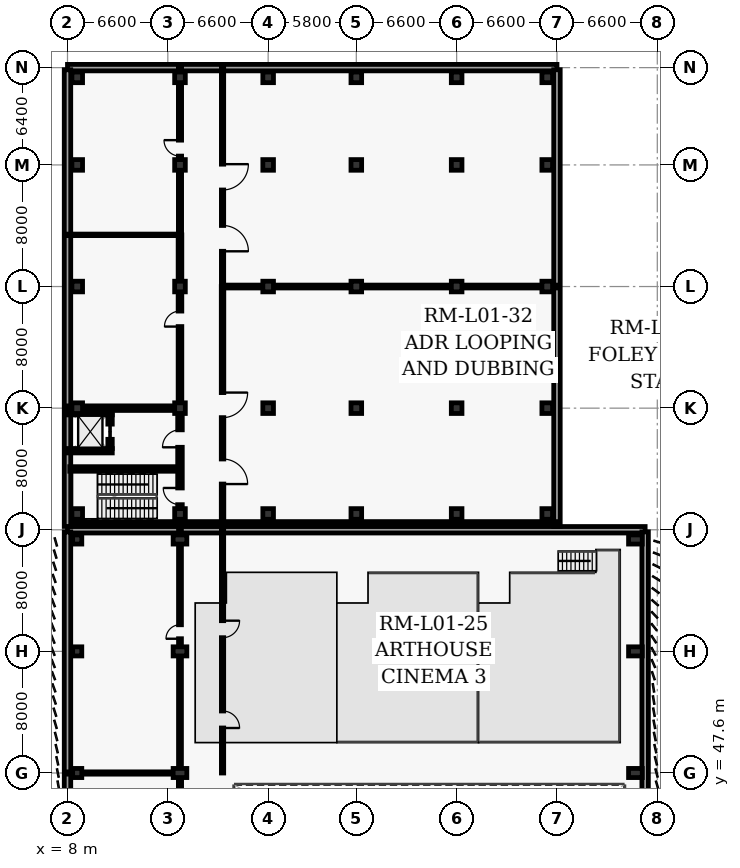
"""IFC4 building model, lengths in metres.
Left out: names, types, materials, properties, quantities, classifications, styles, units other than length and angle.
Written with IfcOpenShell. Run it as: python <this file> out.ifc"""

import sys

from ifc_helpers import new_model, si_unit, direction, frame, frame_2d, origin, origin_2d, place, context, subcontext, project, spatial, rectangle, extrude, element, fill, save


model = new_model("IFC4")
c1 = context("Model", 3, precision=1e-05, world=origin(), true_north=direction((0.0, 1.0)))
c2 = subcontext(c1, "Body", "Model", "MODEL_VIEW")
j1 = project(units=[si_unit("LENGTHUNIT", "METRE"), si_unit("PLANEANGLEUNIT", "RADIAN")], contexts=[c1])
p1 = place(None, origin())
s1 = spatial("IfcSite", under=j1, at=p1, CompositionType="ELEMENT")
p2 = place(p1, origin())
s2 = spatial("IfcBuilding", under=s1, at=p2, CompositionType="ELEMENT")
p3 = place(p2, frame((0.0, 0.0, 5.4)))
s3 = spatial("IfcBuildingStorey", under=s2, at=p3, CompositionType="ELEMENT", Elevation=5.4)
for number, where, z_axis, x_axis in (
    (1, (8.64, 47.6, 0.0), (0.0, 0.0, 1.0), (1.0, 0.0, 0.0)),
    (2, (8.64, 55.6, 0.0), (0.0, 0.0, 1.0), (1.0, 0.0, 0.0)),
    (3, (8.64, 62.96, 0.0), (0.0, 0.0, 1.0), (1.0, 0.0, 0.0)),
):
    element("IfcColumn", number, at=place(p3, frame(where, z_axis=z_axis, x_axis=x_axis)), inside=s3, PredefinedType="COLUMN", context=c2, shape_type="SweptSolid", body=[
        extrude(rectangle(XDim=0.6, YDim=0.6, at=origin_2d()), origin(), (0.0, 0.0, 1.0), 4.8),
    ])
for number, where, z_axis, x_axis in (
    (4, (15.4, 47.6, 0.0), (0.0, 0.0, 1.0), (1.0, 0.0, 0.0)),
    (5, (15.4, 55.6, 0.0), (0.0, 0.0, 1.0), (1.0, 0.0, 0.0)),
    (6, (15.4, 62.96, 0.0), (0.0, 0.0, 1.0), (1.0, 0.0, 0.0)),
    (7, (45.36, 47.6, 0.0), (0.0, 0.0, 1.0), (1.0, 0.0, 0.0)),
    (8, (45.36, 55.6, 0.0), (0.0, 0.0, 1.0), (1.0, 0.0, 0.0)),
    (9, (45.36, 62.96, 0.0), (0.0, 0.0, 1.0), (1.0, 0.0, 0.0)),
):
    element("IfcColumn", number, at=place(p3, frame(where, z_axis=z_axis, x_axis=x_axis)), inside=s3, PredefinedType="COLUMN", context=c2, shape_type="SweptSolid", body=[
        extrude(rectangle(XDim=0.6, YDim=0.9, at=origin_2d()), origin(), (0.0, 0.0, 1.0), 4.8),
    ])
for number, where, z_axis, x_axis in (
    (10, (8.64, 64.64, 0.0), (0.0, 0.0, 1.0), (1.0, 0.0, 0.0)),
    (11, (8.64, 71.6, 0.0), (0.0, 0.0, 1.0), (1.0, 0.0, 0.0)),
    (12, (8.64, 79.6, 0.0), (0.0, 0.0, 1.0), (1.0, 0.0, 0.0)),
    (13, (8.64, 87.6, 0.0), (0.0, 0.0, 1.0), (1.0, 0.0, 0.0)),
    (14, (8.64, 93.36, 0.0), (0.0, 0.0, 1.0), (1.0, 0.0, 0.0)),
    (15, (15.4, 64.64, 0.0), (0.0, 0.0, 1.0), (1.0, 0.0, 0.0)),
    (16, (15.4, 71.6, 0.0), (0.0, 0.0, 1.0), (1.0, 0.0, 0.0)),
    (17, (15.4, 79.6, 0.0), (0.0, 0.0, 1.0), (1.0, 0.0, 0.0)),
    (18, (15.4, 87.6, 0.0), (0.0, 0.0, 1.0), (1.0, 0.0, 0.0)),
    (19, (15.4, 93.36, 0.0), (0.0, 0.0, 1.0), (1.0, 0.0, 0.0)),
    (20, (21.2, 64.64, 0.0), (0.0, 0.0, 1.0), (1.0, 0.0, 0.0)),
    (21, (21.2, 71.6, 0.0), (0.0, 0.0, 1.0), (1.0, 0.0, 0.0)),
    (22, (21.2, 79.6, 0.0), (0.0, 0.0, 1.0), (1.0, 0.0, 0.0)),
    (23, (21.2, 87.6, 0.0), (0.0, 0.0, 1.0), (1.0, 0.0, 0.0)),
    (24, (21.2, 93.36, 0.0), (0.0, 0.0, 1.0), (1.0, 0.0, 0.0)),
    (25, (27.0, 64.64, 0.0), (0.0, 0.0, 1.0), (1.0, 0.0, 0.0)),
    (26, (27.0, 71.6, 0.0), (0.0, 0.0, 1.0), (1.0, 0.0, 0.0)),
    (27, (27.0, 79.6, 0.0), (0.0, 0.0, 1.0), (1.0, 0.0, 0.0)),
    (28, (27.0, 87.6, 0.0), (0.0, 0.0, 1.0), (1.0, 0.0, 0.0)),
    (29, (27.0, 93.36, 0.0), (0.0, 0.0, 1.0), (1.0, 0.0, 0.0)),
    (30, (33.6, 64.64, 0.0), (0.0, 0.0, 1.0), (1.0, 0.0, 0.0)),
    (31, (33.6, 71.6, 0.0), (0.0, 0.0, 1.0), (1.0, 0.0, 0.0)),
    (32, (33.6, 79.6, 0.0), (0.0, 0.0, 1.0), (1.0, 0.0, 0.0)),
    (33, (33.6, 87.6, 0.0), (0.0, 0.0, 1.0), (1.0, 0.0, 0.0)),
    (34, (33.6, 93.36, 0.0), (0.0, 0.0, 1.0), (1.0, 0.0, 0.0)),
    (35, (39.56, 64.64, 0.0), (0.0, 0.0, 1.0), (1.0, 0.0, 0.0)),
    (36, (39.56, 71.6, 0.0), (0.0, 0.0, 1.0), (1.0, 0.0, 0.0)),
    (37, (39.56, 79.6, 0.0), (0.0, 0.0, 1.0), (1.0, 0.0, 0.0)),
    (38, (39.56, 87.6, 0.0), (0.0, 0.0, 1.0), (1.0, 0.0, 0.0)),
    (39, (39.56, 93.36, 0.0), (0.0, 0.0, 1.0), (1.0, 0.0, 0.0)),
):
    element("IfcColumn", number, at=place(p3, frame(where, z_axis=z_axis, x_axis=x_axis)), inside=s3, PredefinedType="COLUMN", context=c2, shape_type="SweptSolid", body=[
        extrude(rectangle(XDim=0.7, YDim=0.7, at=origin_2d()), origin(), (0.0, 0.0, 1.0), 4.8),
    ])
p4 = place(p3, frame((8.0, 63.6, 0.0), z_axis=(0.0, 0.0, 1.0), x_axis=(1.0, 0.0, 0.0)))
e40 = element("IfcWall", 40, at=p4, inside=s3, PredefinedType="SOLIDWALL", context=c2, shape_type="SweptSolid", body=[
    extrude(rectangle(XDim=38.0, YDim=0.425, at=frame_2d((19.0, 0.0))), origin(), (0.0, 0.0, 1.0), 4.52),
])
for number, where, z_axis, x_axis in (
    (41, (46.0, 63.46, 0.0), (0.0, 0.0, 1.0), (0.0, -1.0, 0.0)),
    (42, (8.0, 7.74, 0.0), (0.0, 0.0, 1.0), (0.0, 1.0, 0.0)),
):
    element("IfcWall", number, at=place(p3, frame(where, z_axis=z_axis, x_axis=x_axis)), inside=s3, PredefinedType="SOLIDWALL", context=c2, shape_type="SweptSolid", body=[
        extrude(rectangle(XDim=55.72, YDim=0.425, at=frame_2d((27.86, 0.0))), origin(), (0.0, 0.0, 1.0), 4.52),
    ])
p5 = place(p3, frame((8.0, 94.0, 0.0), z_axis=(0.0, 0.0, 1.0), x_axis=(1.0, 0.0, 0.0)))
e43 = element("IfcWall", 43, at=p5, inside=s3, PredefinedType="SOLIDWALL", context=c2, shape_type="SweptSolid", body=[
    extrude(rectangle(XDim=32.2, YDim=0.425, at=frame_2d((16.1, 0.0))), origin(), (0.0, 0.0, 1.0), 3.075),
])
p6 = place(p3, frame((40.2, 93.86, 0.0), z_axis=(0.0, 0.0, 1.0), x_axis=(0.0, -1.0, 0.0)))
e44 = element("IfcWall", 44, at=p6, inside=s3, PredefinedType="SOLIDWALL", context=c2, shape_type="SweptSolid", body=[
    extrude(rectangle(XDim=30.042, YDim=0.425, at=frame_2d((15.021, 0.0))), origin(), (0.0, 0.0, 1.0), 4.475),
])
p7 = place(p3, frame((40.2, 64.0, 0.0), z_axis=(0.0, 0.0, 1.0), x_axis=(-1.0, 0.0, 0.0)))
e45 = element("IfcWall", 45, at=p7, inside=s3, PredefinedType="SOLIDWALL", context=c2, shape_type="SweptSolid", body=[
    extrude(rectangle(XDim=32.2, YDim=0.275, at=frame_2d((16.1, 0.0))), origin(), (0.0, 0.0, 1.0), 3.075),
])
p8 = place(p3, frame((8.0, 63.818, 0.0), z_axis=(0.0, 0.0, 1.0), x_axis=(0.0, 1.0, 0.0)))
e46 = element("IfcWall", 46, at=p8, inside=s3, PredefinedType="SOLIDWALL", context=c2, shape_type="SweptSolid", body=[
    extrude(rectangle(XDim=30.042, YDim=0.425, at=frame_2d((15.021, 0.0))), origin(), (0.0, 0.0, 1.0), 4.475),
])
p9 = place(p3, frame((7.85, 71.6, 0.0), z_axis=(0.0, 0.0, 1.0), x_axis=(1.0, 0.0, 0.0)))
e47 = element("IfcWall", 47, at=p9, inside=s3, PredefinedType="SHEAR", context=c2, shape_type="SweptSolid", body=[
    extrude(rectangle(XDim=7.198, YDim=0.3, at=frame_2d((3.599, 0.0))), origin(), (0.0, 0.0, 1.0), 4.475),
])
p10 = place(p3, frame((15.4, 64.15, 0.0), z_axis=(0.0, 0.0, 1.0), x_axis=(0.0, 1.0, 0.0)))
e48 = element("IfcWall", 48, at=p10, inside=s3, PredefinedType="SHEAR", context=c2, shape_type="SweptSolid", body=[
    extrude(rectangle(XDim=7.098, YDim=0.3, at=frame_2d((3.549, 0.0))), origin(), (0.0, 0.0, 1.0), 4.475),
])
p11 = place(p10, frame((1.1, 0.0, 0.0)))
e49 = element("IfcOpeningElement", 49, at=p11, cuts=e48, PredefinedType="OPENING", context=c2, shape_type="SweptSolid", body=[
    extrude(rectangle(XDim=1.1, YDim=2.15, at=frame_2d((0.55, 1.075))), frame((0.0, 0.16, 0.0), z_axis=(0.0, -1.0, 0.0), x_axis=(1.0, 0.0, 0.0)), (0.0, 0.0, 1.0), 0.32),
])
p12 = place(p10, frame((4.875, 0.0, 0.0)))
e50 = element("IfcOpeningElement", 50, at=p12, cuts=e48, PredefinedType="OPENING", context=c2, shape_type="SweptSolid", body=[
    extrude(rectangle(XDim=1.15, YDim=2.2, at=frame_2d((0.575, 1.1))), frame((0.0, 0.16, 0.0), z_axis=(0.0, -1.0, 0.0), x_axis=(1.0, 0.0, 0.0)), (0.0, 0.0, 1.0), 0.32),
])
p13 = place(p3, frame((8.15, 67.6, 0.0), z_axis=(0.0, 0.0, 1.0), x_axis=(1.0, 0.0, 0.0)))
e51 = element("IfcWall", 51, at=p13, inside=s3, PredefinedType="SHEAR", context=c2, shape_type="SweptSolid", body=[
    extrude(rectangle(XDim=7.1, YDim=0.3, at=frame_2d((3.55, 0.0))), origin(), (0.0, 0.0, 1.0), 4.475),
])
for number, where, z_axis, x_axis in (
    (52, (8.055, 68.8, 0.0), (0.0, 0.0, 1.0), (1.0, 0.0, 0.0)),
    (53, (8.055, 71.3, 0.0), (0.0, 0.0, 1.0), (1.0, 0.0, 0.0)),
):
    element("IfcWall", number, at=place(p3, frame(where, z_axis=z_axis, x_axis=x_axis)), inside=s3, PredefinedType="SHEAR", context=c2, shape_type="SweptSolid", body=[
        extrude(rectangle(XDim=2.89, YDim=0.29, at=frame_2d((1.445, 0.0))), origin(), (0.0, 0.0, 1.0), 4.475),
    ])
p14 = place(p3, frame((10.8, 68.945, 0.0), z_axis=(0.0, 0.0, 1.0), x_axis=(0.0, 1.0, 0.0)))
e54 = element("IfcWall", 54, at=p14, inside=s3, PredefinedType="SHEAR", context=c2, shape_type="SweptSolid", body=[
    extrude(rectangle(XDim=2.21, YDim=0.29, at=frame_2d((1.105, 0.0))), origin(), (0.0, 0.0, 1.0), 4.475),
])
p15 = place(p14, frame((0.605, 0.0, 0.0)))
e55 = element("IfcOpeningElement", 55, at=p15, cuts=e54, PredefinedType="OPENING", context=c2, shape_type="SweptSolid", body=[
    extrude(rectangle(XDim=1.0, YDim=2.15, at=frame_2d((0.5, 1.075))), frame((0.0, 0.155, 0.0), z_axis=(0.0, -1.0, 0.0), x_axis=(1.0, 0.0, 0.0)), (0.0, 0.0, 1.0), 0.31),
])
p16 = place(p3, frame((15.4, 26.4, 0.0), z_axis=(0.0, 0.0, 1.0), x_axis=(0.0, 1.0, 0.0)))
e56 = element("IfcWall", 56, at=p16, inside=s3, PredefinedType="PARTITIONING", context=c2, shape_type="SweptSolid", body=[
    extrude(rectangle(XDim=20.748, YDim=0.21, at=frame_2d((10.374, 0.0))), origin(), (0.0, 0.0, 1.0), 3.67),
])
p17 = place(p16, frame((9.834, 0.0, 0.0)))
e57 = element("IfcOpeningElement", 57, at=p17, cuts=e56, PredefinedType="OPENING", context=c2, shape_type="SweptSolid", body=[
    extrude(rectangle(XDim=1.08, YDim=2.15, at=frame_2d((0.54, 1.075))), frame((0.0, 0.115, 0.0), z_axis=(0.0, -1.0, 0.0), x_axis=(1.0, 0.0, 0.0)), (0.0, 0.0, 1.0), 0.23),
])
p18 = place(p3, frame((15.4, 48.052, 0.0), z_axis=(0.0, 0.0, 1.0), x_axis=(0.0, 1.0, 0.0)))
e58 = element("IfcWall", 58, at=p18, inside=s3, PredefinedType="PARTITIONING", context=c2, shape_type="SweptSolid", body=[
    extrude(rectangle(XDim=15.548, YDim=0.19, at=frame_2d((7.774, 0.0))), origin(), (0.0, 0.0, 1.0), 3.67),
])
p19 = place(p18, frame((8.38, 0.0, 0.0)))
e59 = element("IfcOpeningElement", 59, at=p19, cuts=e58, PredefinedType="OPENING", context=c2, shape_type="SweptSolid", body=[
    extrude(rectangle(XDim=0.92, YDim=2.1, at=frame_2d((0.46, 1.05))), frame((0.0, 0.105, 0.0), z_axis=(0.0, -1.0, 0.0), x_axis=(1.0, 0.0, 0.0)), (0.0, 0.0, 1.0), 0.21),
])
p20 = place(p3, frame((18.2, 63.6, 0.0), z_axis=(0.0, 0.0, 1.0), x_axis=(0.0, -1.0, 0.0)))
e60 = element("IfcWall", 60, at=p20, inside=s3, PredefinedType="PARTITIONING", context=c2, shape_type="SweptSolid", body=[
    extrude(rectangle(XDim=16.0, YDim=0.15, at=frame_2d((8.0, 0.0))), origin(), (0.0, 0.0, 1.0), 4.52),
])
p21 = place(p20, frame((5.98, 0.0, 0.0)))
e61 = element("IfcOpeningElement", 61, at=p21, cuts=e60, PredefinedType="OPENING", context=c2, shape_type="SweptSolid", body=[
    extrude(rectangle(XDim=1.12, YDim=2.15, at=frame_2d((0.56, 1.075))), frame((0.0, 0.085, 0.0), z_axis=(0.0, -1.0, 0.0), x_axis=(1.0, 0.0, 0.0)), (0.0, 0.0, 1.0), 0.17),
])
p22 = place(p20, frame((11.92, 0.0, 0.0)))
e62 = element("IfcOpeningElement", 62, at=p22, cuts=e60, PredefinedType="OPENING", context=c2, shape_type="SweptSolid", body=[
    extrude(rectangle(XDim=1.12, YDim=2.15, at=frame_2d((0.56, 1.075))), frame((0.0, 0.085, 0.0), z_axis=(0.0, -1.0, 0.0), x_axis=(1.0, 0.0, 0.0)), (0.0, 0.0, 1.0), 0.17),
])
p23 = place(p3, frame((8.0, 47.6, 0.0), z_axis=(0.0, 0.0, 1.0), x_axis=(1.0, 0.0, 0.0)))
e63 = element("IfcWall", 63, at=p23, inside=s3, PredefinedType="PARTITIONING", context=c2, shape_type="SweptSolid", body=[
    extrude(rectangle(XDim=7.098, YDim=0.15, at=frame_2d((3.549, 0.0))), origin(), (0.0, 0.0, 1.0), 3.87),
])
p24 = place(p3, frame((18.2, 79.6, 0.0), z_axis=(0.0, 0.0, 1.0), x_axis=(0.0, -1.0, 0.0)))
e64 = element("IfcWall", 64, at=p24, inside=s3, PredefinedType="PARTITIONING", context=c2, shape_type="SweptSolid", body=[
    extrude(rectangle(XDim=15.6, YDim=0.165, at=frame_2d((7.8, 0.0))), origin(), (0.0, 0.0, 1.0), 4.475),
])
p25 = place(p24, frame((6.975, 0.0, 0.0)))
e65 = element("IfcOpeningElement", 65, at=p25, cuts=e64, PredefinedType="OPENING", context=c2, shape_type="SweptSolid", body=[
    extrude(rectangle(XDim=1.65, YDim=2.3, at=frame_2d((0.825, 1.15))), frame((0.0, 0.093, 0.0), z_axis=(0.0, -1.0, 0.0), x_axis=(1.0, 0.0, 0.0)), (0.0, 0.0, 1.0), 0.185),
])
p26 = place(p24, frame((11.343, 0.0, 0.0)))
e66 = element("IfcOpeningElement", 66, at=p26, cuts=e64, PredefinedType="OPENING", context=c2, shape_type="SweptSolid", body=[
    extrude(rectangle(XDim=1.65, YDim=2.3, at=frame_2d((0.825, 1.15))), frame((0.0, 0.093, 0.0), z_axis=(0.0, -1.0, 0.0), x_axis=(1.0, 0.0, 0.0)), (0.0, 0.0, 1.0), 0.185),
])
p27 = place(p3, frame((18.2, 94.0, 0.0), z_axis=(0.0, 0.0, 1.0), x_axis=(0.0, -1.0, 0.0)))
e67 = element("IfcWall", 67, at=p27, inside=s3, PredefinedType="PARTITIONING", context=c2, shape_type="SweptSolid", body=[
    extrude(rectangle(XDim=14.4, YDim=0.15, at=frame_2d((7.2, 0.0))), origin(), (0.0, 0.0, 1.0), 4.475),
])
p28 = place(p27, frame((6.35, 0.0, 0.0)))
e68 = element("IfcOpeningElement", 68, at=p28, cuts=e67, PredefinedType="OPENING", context=c2, shape_type="SweptSolid", body=[
    extrude(rectangle(XDim=1.7, YDim=2.3, at=frame_2d((0.85, 1.15))), frame((0.0, 0.085, 0.0), z_axis=(0.0, -1.0, 0.0), x_axis=(1.0, 0.0, 0.0)), (0.0, 0.0, 1.0), 0.17),
])
p29 = place(p27, frame((10.382, 0.0, 0.0)))
e69 = element("IfcOpeningElement", 69, at=p29, cuts=e67, PredefinedType="OPENING", context=c2, shape_type="SweptSolid", body=[
    extrude(rectangle(XDim=1.7, YDim=2.3, at=frame_2d((0.85, 1.15))), frame((0.0, 0.085, 0.0), z_axis=(0.0, -1.0, 0.0), x_axis=(1.0, 0.0, 0.0)), (0.0, 0.0, 1.0), 0.17),
])
p30 = place(p3, frame((15.4, 71.952, 0.0), z_axis=(0.0, 0.0, 1.0), x_axis=(0.0, 1.0, 0.0)))
e70 = element("IfcWall", 70, at=p30, inside=s3, PredefinedType="PARTITIONING", context=c2, shape_type="SweptSolid", body=[
    extrude(rectangle(XDim=11.048, YDim=0.24, at=frame_2d((5.524, 0.0))), origin(), (0.0, 0.0, 1.0), 3.625),
])
p31 = place(p30, frame((5.014, 0.0, 0.0)))
e71 = element("IfcOpeningElement", 71, at=p31, cuts=e70, PredefinedType="OPENING", context=c2, shape_type="SweptSolid", body=[
    extrude(rectangle(XDim=1.02, YDim=2.1, at=frame_2d((0.51, 1.05))), frame((0.0, 0.13, 0.0), z_axis=(0.0, -1.0, 0.0), x_axis=(1.0, 0.0, 0.0)), (0.0, 0.0, 1.0), 0.26),
])
p32 = place(p3, frame((15.4, 83.0, 0.0), z_axis=(0.0, 0.0, 1.0), x_axis=(0.0, 1.0, 0.0)))
e72 = element("IfcWall", 72, at=p32, inside=s3, PredefinedType="PARTITIONING", context=c2, shape_type="SweptSolid", body=[
    extrude(rectangle(XDim=11.0, YDim=0.21, at=frame_2d((5.5, 0.0))), origin(), (0.0, 0.0, 1.0), 3.625),
])
p33 = place(p32, frame((5.18, 0.0, 0.0)))
e73 = element("IfcOpeningElement", 73, at=p33, cuts=e72, PredefinedType="OPENING", context=c2, shape_type="SweptSolid", body=[
    extrude(rectangle(XDim=1.05, YDim=2.15, at=frame_2d((0.525, 1.075))), frame((0.0, 0.115, 0.0), z_axis=(0.0, -1.0, 0.0), x_axis=(1.0, 0.0, 0.0)), (0.0, 0.0, 1.0), 0.23),
])
p34 = place(p3, frame((18.2, 79.6, 0.0), z_axis=(0.0, 0.0, 1.0), x_axis=(1.0, 0.0, 0.0)))
e74 = element("IfcWall", 74, at=p34, inside=s3, PredefinedType="PARTITIONING", context=c2, shape_type="SweptSolid", body=[
    extrude(rectangle(XDim=22.0, YDim=0.19, at=frame_2d((11.0, 0.0))), origin(), (0.0, 0.0, 1.0), 3.075),
])
p35 = place(p3, frame((8.0, 83.0, 0.0), z_axis=(0.0, 0.0, 1.0), x_axis=(1.0, 0.0, 0.0)))
e75 = element("IfcWall", 75, at=p35, inside=s3, PredefinedType="PARTITIONING", context=c2, shape_type="SweptSolid", body=[
    extrude(rectangle(XDim=7.4, YDim=0.1, at=frame_2d((3.7, 0.0))), origin(), (0.0, 0.0, 1.0), 4.475),
])
p36 = place(p11, origin())
e76 = element("IfcDoor", 76, at=p36, inside=s3, OperationType="SINGLE_SWING_RIGHT", PredefinedType="DOOR", context=c2, shape_type="SweptSolid", body=[
    extrude(rectangle(XDim=1.1, YDim=2.15, at=frame_2d((0.55, 1.075))), frame((0.0, 0.025, 0.0), z_axis=(0.0, -1.0, 0.0), x_axis=(1.0, 0.0, 0.0)), (0.0, 0.0, 1.0), 0.05),
])
fill(e49, e76)
p37 = place(p12, origin())
e77 = element("IfcDoor", 77, at=p37, inside=s3, OperationType="SINGLE_SWING_LEFT", PredefinedType="DOOR", context=c2, shape_type="SweptSolid", body=[
    extrude(rectangle(XDim=1.15, YDim=2.2, at=frame_2d((0.575, 1.1))), frame((0.0, 0.025, 0.0), z_axis=(0.0, -1.0, 0.0), x_axis=(1.0, 0.0, 0.0)), (0.0, 0.0, 1.0), 0.05),
])
fill(e50, e77)
p38 = place(p15, origin())
e78 = element("IfcDoor", 78, at=p38, inside=s3, OperationType="SLIDING_TO_LEFT", PredefinedType="DOOR", context=c2, shape_type="SweptSolid", body=[
    extrude(rectangle(XDim=1.0, YDim=2.15, at=frame_2d((0.5, 1.075))), frame((0.0, 0.025, 0.0), z_axis=(0.0, -1.0, 0.0), x_axis=(1.0, 0.0, 0.0)), (0.0, 0.0, 1.0), 0.05),
])
fill(e55, e78)
p39 = place(p19, origin())
e79 = element("IfcDoor", 79, at=p39, inside=s3, OperationType="SINGLE_SWING_LEFT", PredefinedType="DOOR", context=c2, shape_type="SweptSolid", body=[
    extrude(rectangle(XDim=0.92, YDim=2.1, at=frame_2d((0.46, 1.05))), frame((0.0, 0.025, 0.0), z_axis=(0.0, -1.0, 0.0), x_axis=(1.0, 0.0, 0.0)), (0.0, 0.0, 1.0), 0.05),
])
fill(e59, e79)
p40 = place(p21, origin())
e80 = element("IfcDoor", 80, at=p40, inside=s3, OperationType="SINGLE_SWING_LEFT", PredefinedType="DOOR", context=c2, shape_type="SweptSolid", body=[
    extrude(rectangle(XDim=1.12, YDim=2.15, at=frame_2d((0.56, 1.075))), frame((0.0, 0.025, 0.0), z_axis=(0.0, -1.0, 0.0), x_axis=(1.0, 0.0, 0.0)), (0.0, 0.0, 1.0), 0.05),
])
fill(e61, e80)
p41 = place(p22, origin())
e81 = element("IfcDoor", 81, at=p41, inside=s3, OperationType="SINGLE_SWING_RIGHT", PredefinedType="DOOR", context=c2, shape_type="SweptSolid", body=[
    extrude(rectangle(XDim=1.12, YDim=2.15, at=frame_2d((0.56, 1.075))), frame((0.0, 0.025, 0.0), z_axis=(0.0, -1.0, 0.0), x_axis=(1.0, 0.0, 0.0)), (0.0, 0.0, 1.0), 0.05),
])
fill(e62, e81)
p42 = place(p25, origin())
e82 = element("IfcDoor", 82, at=p42, inside=s3, OperationType="SINGLE_SWING_LEFT", PredefinedType="DOOR", context=c2, shape_type="SweptSolid", body=[
    extrude(rectangle(XDim=1.65, YDim=2.3, at=frame_2d((0.825, 1.15))), frame((0.0, 0.025, 0.0), z_axis=(0.0, -1.0, 0.0), x_axis=(1.0, 0.0, 0.0)), (0.0, 0.0, 1.0), 0.05),
])
fill(e65, e82)
p43 = place(p26, origin())
e83 = element("IfcDoor", 83, at=p43, inside=s3, OperationType="SINGLE_SWING_RIGHT", PredefinedType="DOOR", context=c2, shape_type="SweptSolid", body=[
    extrude(rectangle(XDim=1.65, YDim=2.3, at=frame_2d((0.825, 1.15))), frame((0.0, 0.025, 0.0), z_axis=(0.0, -1.0, 0.0), x_axis=(1.0, 0.0, 0.0)), (0.0, 0.0, 1.0), 0.05),
])
fill(e66, e83)
p44 = place(p28, origin())
e84 = element("IfcDoor", 84, at=p44, inside=s3, OperationType="SINGLE_SWING_LEFT", PredefinedType="DOOR", context=c2, shape_type="SweptSolid", body=[
    extrude(rectangle(XDim=1.7, YDim=2.3, at=frame_2d((0.85, 1.15))), frame((0.0, 0.025, 0.0), z_axis=(0.0, -1.0, 0.0), x_axis=(1.0, 0.0, 0.0)), (0.0, 0.0, 1.0), 0.05),
])
fill(e68, e84)
p45 = place(p29, origin())
e85 = element("IfcDoor", 85, at=p45, inside=s3, OperationType="SINGLE_SWING_RIGHT", PredefinedType="DOOR", context=c2, shape_type="SweptSolid", body=[
    extrude(rectangle(XDim=1.7, YDim=2.3, at=frame_2d((0.85, 1.15))), frame((0.0, 0.025, 0.0), z_axis=(0.0, -1.0, 0.0), x_axis=(1.0, 0.0, 0.0)), (0.0, 0.0, 1.0), 0.05),
])
fill(e69, e85)
p46 = place(p31, origin())
e86 = element("IfcDoor", 86, at=p46, inside=s3, OperationType="SINGLE_SWING_LEFT", PredefinedType="DOOR", context=c2, shape_type="SweptSolid", body=[
    extrude(rectangle(XDim=1.02, YDim=2.1, at=frame_2d((0.51, 1.05))), frame((0.0, 0.025, 0.0), z_axis=(0.0, -1.0, 0.0), x_axis=(1.0, 0.0, 0.0)), (0.0, 0.0, 1.0), 0.05),
])
fill(e71, e86)
p47 = place(p33, origin())
e87 = element("IfcDoor", 87, at=p47, inside=s3, OperationType="SINGLE_SWING_RIGHT", PredefinedType="DOOR", context=c2, shape_type="SweptSolid", body=[
    extrude(rectangle(XDim=1.05, YDim=2.15, at=frame_2d((0.525, 1.075))), frame((0.0, 0.025, 0.0), z_axis=(0.0, -1.0, 0.0), x_axis=(1.0, 0.0, 0.0)), (0.0, 0.0, 1.0), 0.05),
])
fill(e73, e87)
save(model, sys.argv[1])
